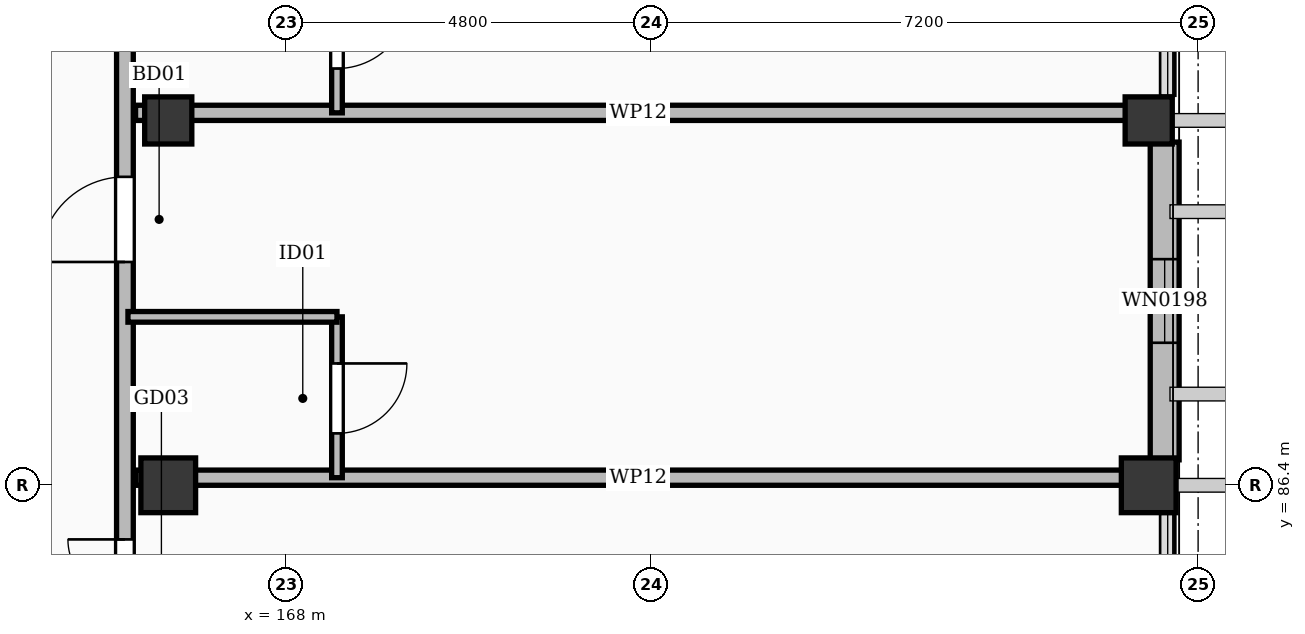
"""IFC4 building model, lengths in metres.
Left out: names, types, materials, properties, quantities, classifications, styles, units other than length and angle.
Written with IfcOpenShell. Run it as: python <this file> out.ifc"""

import sys

from ifc_helpers import new_model, si_unit, direction, frame, frame_2d, origin, origin_2d, place, context, subcontext, project, spatial, rectangle, extrude, element, fill, save


model = new_model("IFC4")
c1 = context("Model", 3, precision=1e-05, world=origin(), true_north=direction((0.0, 1.0)))
c2 = subcontext(c1, "Body", "Model", "MODEL_VIEW")
j1 = project(units=[si_unit("LENGTHUNIT", "METRE"), si_unit("PLANEANGLEUNIT", "RADIAN")], contexts=[c1])
p1 = place(None, origin())
s1 = spatial("IfcSite", under=j1, at=p1, CompositionType="ELEMENT")
p2 = place(p1, origin())
s2 = spatial("IfcBuilding", under=s1, at=p2, CompositionType="ELEMENT")
p3 = place(p2, frame((0.0, 0.0, 31.8)))
s3 = spatial("IfcBuildingStorey", under=s2, at=p3, CompositionType="ELEMENT", Elevation=31.8)
for number, where, z_axis, x_axis in (
    (1, (166.45, 86.4, 0.0), (0.0, 0.0, 1.0), (1.0, 0.0, 0.0)),
    (2, (179.35, 86.4, 0.0), (0.0, 0.0, 1.0), (1.0, 0.0, 0.0)),
):
    element("IfcColumn", number, at=place(p3, frame(where, z_axis=z_axis, x_axis=x_axis)), inside=s3, PredefinedType="COLUMN", context=c2, shape_type="SweptSolid", body=[
        extrude(rectangle(XDim=0.72, YDim=0.72, at=origin_2d()), origin(), (0.0, 0.0, 1.0), 3.6),
    ])
for number, where, z_axis, x_axis in (
    (3, (166.45, 91.2, 0.0), (0.0, 0.0, 1.0), (1.0, 0.0, 0.0)),
    (4, (179.35, 91.2, 0.0), (0.0, 0.0, 1.0), (1.0, 0.0, 0.0)),
):
    element("IfcColumn", number, at=place(p3, frame(where, z_axis=z_axis, x_axis=x_axis)), inside=s3, PredefinedType="COLUMN", context=c2, shape_type="SweptSolid", body=[
        extrude(rectangle(XDim=0.62, YDim=0.62, at=origin_2d()), origin(), (0.0, 0.0, 1.0), 3.6),
    ])
p4 = place(p3, frame((179.56, 90.915, 0.0), z_axis=(0.0, 0.0, 1.0), x_axis=(0.0, -1.0, 0.0)))
e5 = element("IfcWall", 5, at=p4, inside=s3, PredefinedType="SOLIDWALL", context=c2, shape_type="SweptSolid", body=[
    extrude(rectangle(XDim=4.18, YDim=0.38, at=frame_2d((2.09, 0.0))), origin(), (0.0, 0.0, 1.0), 2.602),
])
p5 = place(p4, frame((1.54, 0.0, 0.55)))
e6 = element("IfcOpeningElement", 6, at=p5, cuts=e5, PredefinedType="OPENING", context=c2, shape_type="SweptSolid", body=[
    extrude(rectangle(XDim=1.1, YDim=1.7, at=frame_2d((0.55, 0.85))), frame((0.0, 0.202, 0.0), z_axis=(0.0, -1.0, 0.0), x_axis=(1.0, 0.0, 0.0)), (0.0, 0.0, 1.0), 0.404),
])
p6 = place(p3, frame((165.88, 48.35, 0.0), z_axis=(0.0, 0.0, 1.0), x_axis=(0.0, 1.0, 0.0)))
e7 = element("IfcWall", 7, at=p6, inside=s3, PredefinedType="PARTITIONING", context=c2, shape_type="SweptSolid", body=[
    extrude(rectangle(XDim=77.3, YDim=0.22, at=frame_2d((38.65, 0.0))), origin(), (0.0, 0.0, 1.0), 2.602),
])
p7 = place(p6, frame((5.15, 0.0, 0.0)))
e8 = element("IfcOpeningElement", 8, at=p7, cuts=e7, PredefinedType="OPENING", context=c2, shape_type="SweptSolid", body=[
    extrude(rectangle(XDim=1.14, YDim=2.26, at=frame_2d((0.57, 1.13))), frame((0.0, 0.122, 0.0), z_axis=(0.0, -1.0, 0.0), x_axis=(1.0, 0.0, 0.0)), (0.0, 0.0, 1.0), 0.244),
])
p8 = place(p6, frame((12.188, 0.0, 0.0)))
e9 = element("IfcOpeningElement", 9, at=p8, cuts=e7, PredefinedType="OPENING", context=c2, shape_type="SweptSolid", body=[
    extrude(rectangle(XDim=1.12, YDim=2.15, at=frame_2d((0.56, 1.075))), frame((0.0, 0.122, 0.0), z_axis=(0.0, -1.0, 0.0), x_axis=(1.0, 0.0, 0.0)), (0.0, 0.0, 1.0), 0.244),
])
p9 = place(p6, frame((16.988, 0.0, 0.0)))
e10 = element("IfcOpeningElement", 10, at=p9, cuts=e7, PredefinedType="OPENING", context=c2, shape_type="SweptSolid", body=[
    extrude(rectangle(XDim=1.28, YDim=2.16, at=frame_2d((0.64, 1.08))), frame((0.0, 0.122, 0.0), z_axis=(0.0, -1.0, 0.0), x_axis=(1.0, 0.0, 0.0)), (0.0, 0.0, 1.0), 0.244),
])
p10 = place(p6, frame((21.788, 0.0, 0.0)))
e11 = element("IfcOpeningElement", 11, at=p10, cuts=e7, PredefinedType="OPENING", context=c2, shape_type="SweptSolid", body=[
    extrude(rectangle(XDim=1.05, YDim=2.18, at=frame_2d((0.525, 1.09))), frame((0.0, 0.122, 0.0), z_axis=(0.0, -1.0, 0.0), x_axis=(1.0, 0.0, 0.0)), (0.0, 0.0, 1.0), 0.244),
])
p11 = place(p6, frame((26.588, 0.0, 0.0)))
e12 = element("IfcOpeningElement", 12, at=p11, cuts=e7, PredefinedType="OPENING", context=c2, shape_type="SweptSolid", body=[
    extrude(rectangle(XDim=1.08, YDim=2.25, at=frame_2d((0.54, 1.125))), frame((0.0, 0.122, 0.0), z_axis=(0.0, -1.0, 0.0), x_axis=(1.0, 0.0, 0.0)), (0.0, 0.0, 1.0), 0.244),
])
p12 = place(p6, frame((31.388, 0.0, 0.0)))
e13 = element("IfcOpeningElement", 13, at=p12, cuts=e7, PredefinedType="OPENING", context=c2, shape_type="SweptSolid", body=[
    extrude(rectangle(XDim=1.02, YDim=2.2, at=frame_2d((0.51, 1.1))), frame((0.0, 0.122, 0.0), z_axis=(0.0, -1.0, 0.0), x_axis=(1.0, 0.0, 0.0)), (0.0, 0.0, 1.0), 0.244),
])
p13 = place(p6, frame((35.838, 0.0, 0.0)))
e14 = element("IfcOpeningElement", 14, at=p13, cuts=e7, PredefinedType="OPENING", context=c2, shape_type="SweptSolid", body=[
    extrude(rectangle(XDim=1.5, YDim=2.3, at=frame_2d((0.75, 1.15))), frame((0.0, 0.122, 0.0), z_axis=(0.0, -1.0, 0.0), x_axis=(1.0, 0.0, 0.0)), (0.0, 0.0, 1.0), 0.244),
])
p14 = place(p6, frame((40.988, 0.0, 0.0)))
e15 = element("IfcOpeningElement", 15, at=p14, cuts=e7, PredefinedType="OPENING", context=c2, shape_type="SweptSolid", body=[
    extrude(rectangle(XDim=1.12, YDim=2.15, at=frame_2d((0.56, 1.075))), frame((0.0, 0.122, 0.0), z_axis=(0.0, -1.0, 0.0), x_axis=(1.0, 0.0, 0.0)), (0.0, 0.0, 1.0), 0.244),
])
p15 = place(p6, frame((45.788, 0.0, 0.0)))
e16 = element("IfcOpeningElement", 16, at=p15, cuts=e7, PredefinedType="OPENING", context=c2, shape_type="SweptSolid", body=[
    extrude(rectangle(XDim=1.28, YDim=2.16, at=frame_2d((0.64, 1.08))), frame((0.0, 0.122, 0.0), z_axis=(0.0, -1.0, 0.0), x_axis=(1.0, 0.0, 0.0)), (0.0, 0.0, 1.0), 0.244),
])
p16 = place(p6, frame((50.588, 0.0, 0.0)))
e17 = element("IfcOpeningElement", 17, at=p16, cuts=e7, PredefinedType="OPENING", context=c2, shape_type="SweptSolid", body=[
    extrude(rectangle(XDim=1.05, YDim=2.18, at=frame_2d((0.525, 1.09))), frame((0.0, 0.122, 0.0), z_axis=(0.0, -1.0, 0.0), x_axis=(1.0, 0.0, 0.0)), (0.0, 0.0, 1.0), 0.244),
])
p17 = place(p6, frame((55.388, 0.0, 0.0)))
e18 = element("IfcOpeningElement", 18, at=p17, cuts=e7, PredefinedType="OPENING", context=c2, shape_type="SweptSolid", body=[
    extrude(rectangle(XDim=1.08, YDim=2.25, at=frame_2d((0.54, 1.125))), frame((0.0, 0.122, 0.0), z_axis=(0.0, -1.0, 0.0), x_axis=(1.0, 0.0, 0.0)), (0.0, 0.0, 1.0), 0.244),
])
p18 = place(p6, frame((60.188, 0.0, 0.0)))
e19 = element("IfcOpeningElement", 19, at=p18, cuts=e7, PredefinedType="OPENING", context=c2, shape_type="SweptSolid", body=[
    extrude(rectangle(XDim=1.02, YDim=2.2, at=frame_2d((0.51, 1.1))), frame((0.0, 0.122, 0.0), z_axis=(0.0, -1.0, 0.0), x_axis=(1.0, 0.0, 0.0)), (0.0, 0.0, 1.0), 0.244),
])
p19 = place(p6, frame((64.638, 0.0, 0.0)))
e20 = element("IfcOpeningElement", 20, at=p19, cuts=e7, PredefinedType="OPENING", context=c2, shape_type="SweptSolid", body=[
    extrude(rectangle(XDim=1.5, YDim=2.3, at=frame_2d((0.75, 1.15))), frame((0.0, 0.122, 0.0), z_axis=(0.0, -1.0, 0.0), x_axis=(1.0, 0.0, 0.0)), (0.0, 0.0, 1.0), 0.244),
])
p20 = place(p6, frame((69.788, 0.0, 0.0)))
e21 = element("IfcOpeningElement", 21, at=p20, cuts=e7, PredefinedType="OPENING", context=c2, shape_type="SweptSolid", body=[
    extrude(rectangle(XDim=1.12, YDim=2.15, at=frame_2d((0.56, 1.075))), frame((0.0, 0.122, 0.0), z_axis=(0.0, -1.0, 0.0), x_axis=(1.0, 0.0, 0.0)), (0.0, 0.0, 1.0), 0.244),
])
p21 = place(p6, frame((74.588, 0.0, 0.0)))
e22 = element("IfcOpeningElement", 22, at=p21, cuts=e7, PredefinedType="OPENING", context=c2, shape_type="SweptSolid", body=[
    extrude(rectangle(XDim=1.28, YDim=2.16, at=frame_2d((0.64, 1.08))), frame((0.0, 0.122, 0.0), z_axis=(0.0, -1.0, 0.0), x_axis=(1.0, 0.0, 0.0)), (0.0, 0.0, 1.0), 0.244),
])
p22 = place(p3, frame((166.02, 86.5, 0.0), z_axis=(0.0, 0.0, 1.0), x_axis=(1.0, 0.0, 0.0)))
e23 = element("IfcWall", 23, at=p22, inside=s3, PredefinedType="PARTITIONING", context=c2, shape_type="SweptSolid", body=[
    extrude(rectangle(XDim=13.23, YDim=0.2, at=frame_2d((6.615, 0.0))), origin(), (0.0, 0.0, 1.0), 2.602),
])
p23 = place(p3, frame((168.67, 86.5, 0.0), z_axis=(0.0, 0.0, 1.0), x_axis=(0.0, 1.0, 0.0)))
e24 = element("IfcWall", 24, at=p23, inside=s3, PredefinedType="PARTITIONING", context=c2, shape_type="SweptSolid", body=[
    extrude(rectangle(XDim=2.116, YDim=0.14, at=frame_2d((1.058, 0.0))), origin(), (0.0, 0.0, 1.0), 2.732),
])
p24 = place(p23, frame((0.583, 0.0, 0.0)))
e25 = element("IfcOpeningElement", 25, at=p24, cuts=e24, PredefinedType="OPENING", context=c2, shape_type="SweptSolid", body=[
    extrude(rectangle(XDim=0.92, YDim=2.1, at=frame_2d((0.46, 1.05))), frame((0.0, 0.082, 0.0), z_axis=(0.0, -1.0, 0.0), x_axis=(1.0, 0.0, 0.0)), (0.0, 0.0, 1.0), 0.164),
])
p25 = place(p3, frame((165.92, 88.616, 0.0), z_axis=(0.0, 0.0, 1.0), x_axis=(1.0, 0.0, 0.0)))
e26 = element("IfcWall", 26, at=p25, inside=s3, PredefinedType="PARTITIONING", context=c2, shape_type="SweptSolid", body=[
    extrude(rectangle(XDim=2.75, YDim=0.14, at=frame_2d((1.375, 0.0))), origin(), (0.0, 0.0, 1.0), 2.732),
])
p26 = place(p3, frame((166.02, 91.3, 0.0), z_axis=(0.0, 0.0, 1.0), x_axis=(1.0, 0.0, 0.0)))
e27 = element("IfcWall", 27, at=p26, inside=s3, PredefinedType="PARTITIONING", context=c2, shape_type="SweptSolid", body=[
    extrude(rectangle(XDim=13.23, YDim=0.2, at=frame_2d((6.615, 0.0))), origin(), (0.0, 0.0, 1.0), 2.602),
])
p27 = place(p3, frame((168.67, 91.3, 0.0), z_axis=(0.0, 0.0, 1.0), x_axis=(0.0, 1.0, 0.0)))
e28 = element("IfcWall", 28, at=p27, inside=s3, PredefinedType="PARTITIONING", context=c2, shape_type="SweptSolid", body=[
    extrude(rectangle(XDim=2.116, YDim=0.14, at=frame_2d((1.058, 0.0))), origin(), (0.0, 0.0, 1.0), 2.732),
])
p28 = place(p27, frame((0.583, 0.0, 0.0)))
e29 = element("IfcOpeningElement", 29, at=p28, cuts=e28, PredefinedType="OPENING", context=c2, shape_type="SweptSolid", body=[
    extrude(rectangle(XDim=0.96, YDim=2.12, at=frame_2d((0.48, 1.06))), frame((0.0, 0.082, 0.0), z_axis=(0.0, -1.0, 0.0), x_axis=(1.0, 0.0, 0.0)), (0.0, 0.0, 1.0), 0.164),
])
p29 = place(p5, origin())
e30 = element("IfcWindow", 30, at=p29, inside=s3, PartitioningType="SINGLE_PANEL", PredefinedType="WINDOW", context=c2, shape_type="SweptSolid", body=[
    extrude(rectangle(XDim=1.1, YDim=1.7, at=frame_2d((0.55, 0.85))), frame((0.0, 0.03, 0.0), z_axis=(0.0, -1.0, 0.0), x_axis=(1.0, 0.0, 0.0)), (0.0, 0.0, 1.0), 0.06),
])
fill(e6, e30)
p30 = place(p13, origin())
e31 = element("IfcDoor", 31, at=p30, inside=s3, OperationType="DOUBLE_DOOR_SINGLE_SWING", PredefinedType="DOOR", context=c2, shape_type="SweptSolid", body=[
    extrude(rectangle(XDim=1.5, YDim=2.3, at=frame_2d((0.75, 1.15))), frame((0.0, 0.025, 0.0), z_axis=(0.0, -1.0, 0.0), x_axis=(1.0, 0.0, 0.0)), (0.0, 0.0, 1.0), 0.05),
])
fill(e14, e31)
p31 = place(p14, origin())
e32 = element("IfcDoor", 32, at=p31, inside=s3, OperationType="SINGLE_SWING_LEFT", PredefinedType="DOOR", context=c2, shape_type="SweptSolid", body=[
    extrude(rectangle(XDim=1.12, YDim=2.15, at=frame_2d((0.56, 1.075))), frame((0.0, 0.025, 0.0), z_axis=(0.0, -1.0, 0.0), x_axis=(1.0, 0.0, 0.0)), (0.0, 0.0, 1.0), 0.05),
])
fill(e15, e32)
p32 = place(p24, frame((0.92, 0.0, 0.0), z_axis=(0.0, 0.0, 1.0), x_axis=(-1.0, 0.0, 0.0)))
e33 = element("IfcDoor", 33, at=p32, inside=s3, OperationType="SINGLE_SWING_RIGHT", PredefinedType="DOOR", context=c2, shape_type="SweptSolid", body=[
    extrude(rectangle(XDim=0.92, YDim=2.1, at=frame_2d((0.46, 1.05))), frame((0.0, 0.025, 0.0), z_axis=(0.0, -1.0, 0.0), x_axis=(1.0, 0.0, 0.0)), (0.0, 0.0, 1.0), 0.05),
])
fill(e25, e33)
p33 = place(p28, frame((0.96, 0.0, 0.0), z_axis=(0.0, 0.0, 1.0), x_axis=(-1.0, 0.0, 0.0)))
e34 = element("IfcDoor", 34, at=p33, inside=s3, OperationType="SINGLE_SWING_RIGHT", PredefinedType="DOOR", context=c2, shape_type="SweptSolid", body=[
    extrude(rectangle(XDim=0.96, YDim=2.12, at=frame_2d((0.48, 1.06))), frame((0.0, 0.025, 0.0), z_axis=(0.0, -1.0, 0.0), x_axis=(1.0, 0.0, 0.0)), (0.0, 0.0, 1.0), 0.05),
])
fill(e29, e34)
save(model, sys.argv[1])
